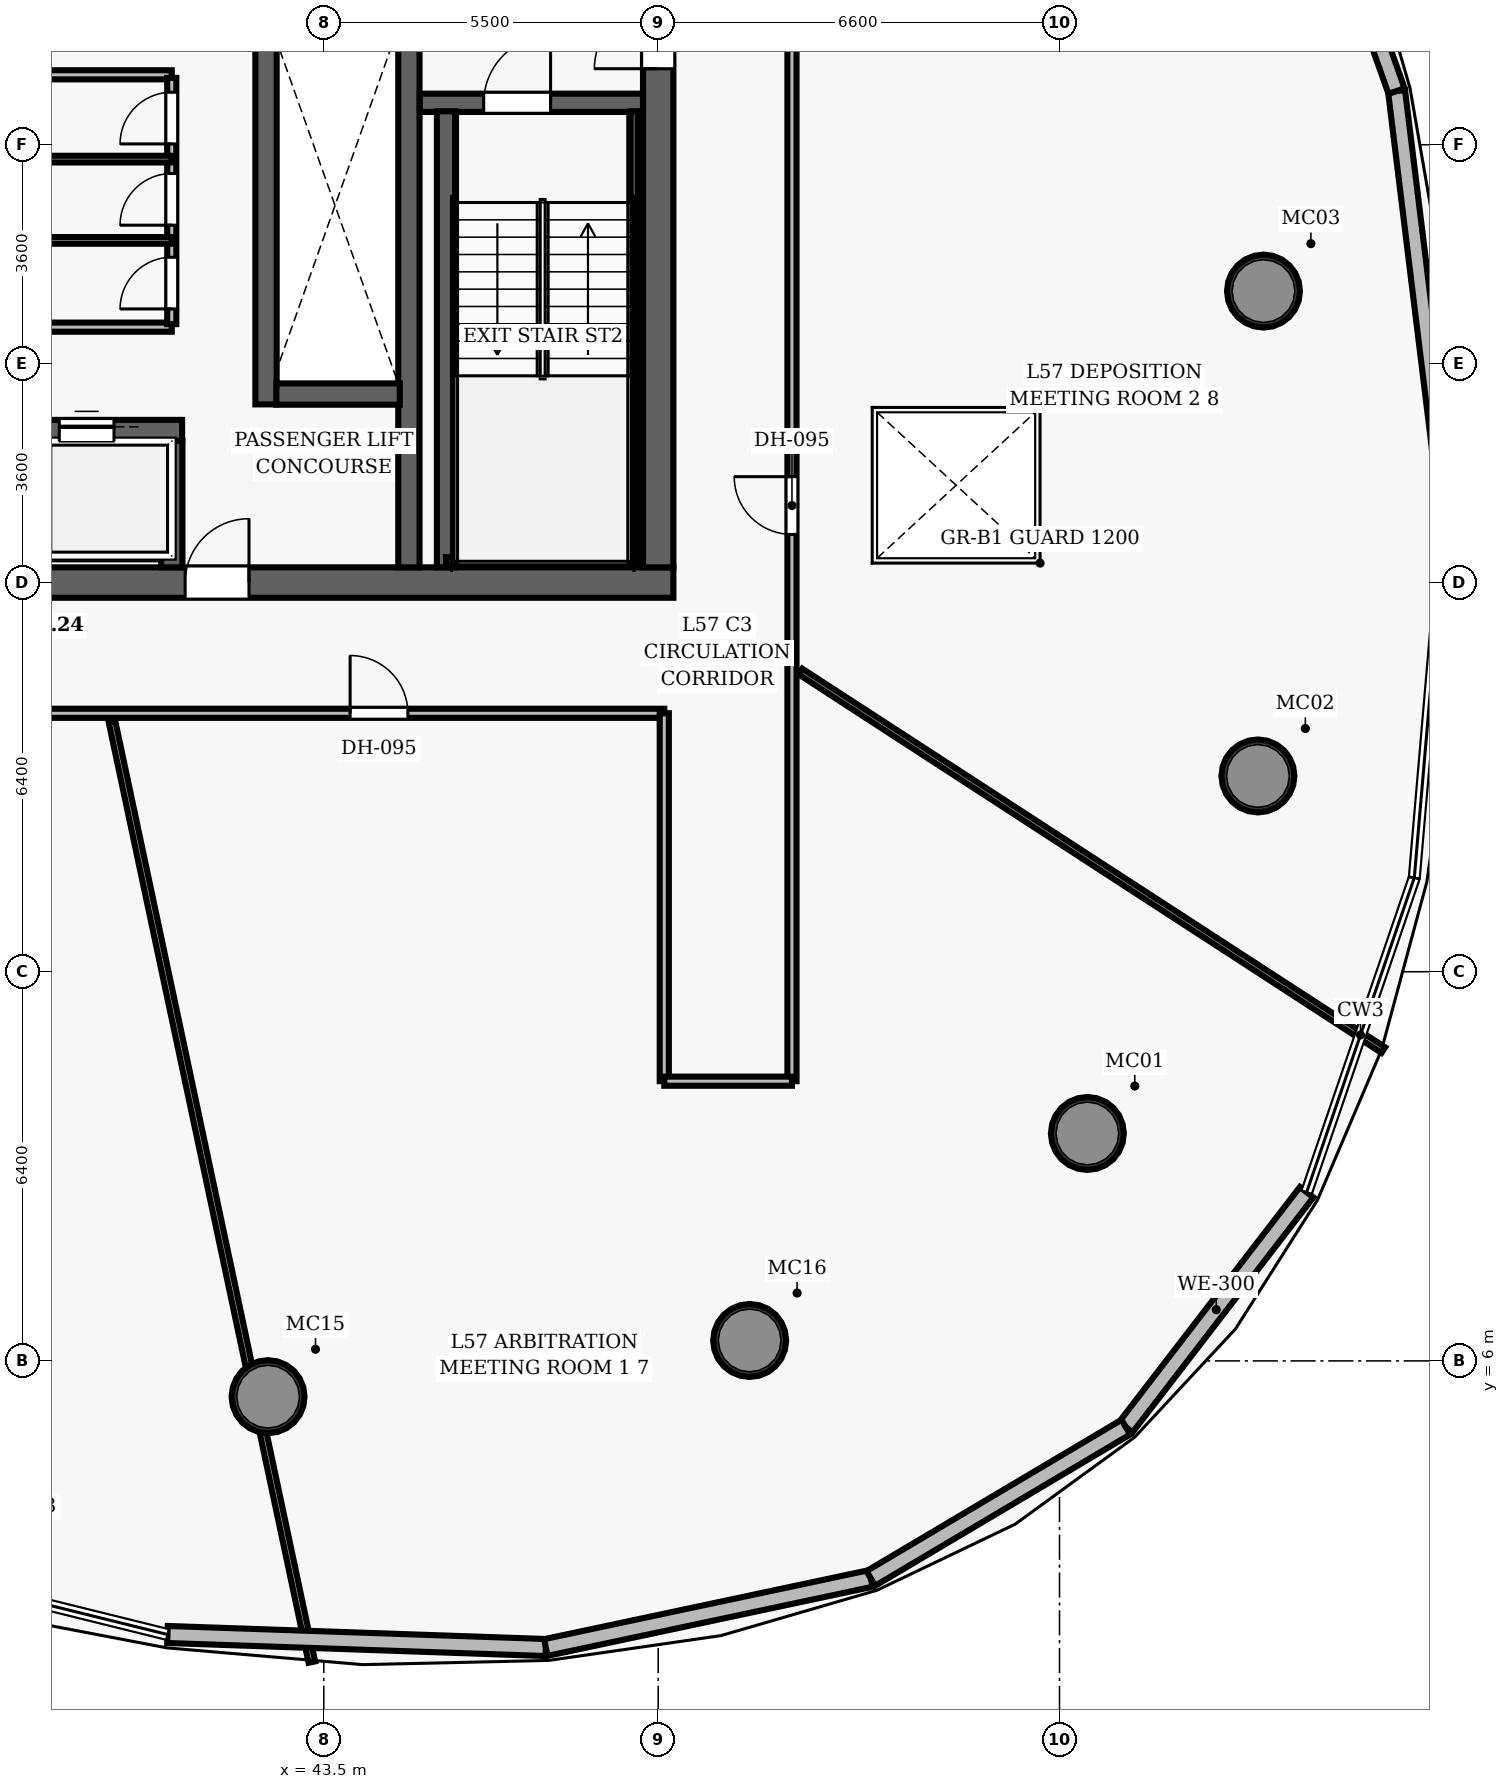
"""IFC4 building model, lengths in metres.
Left out: names, types, materials, properties, quantities, classifications, styles, units other than length and angle.
Written with IfcOpenShell. Run it as: python <this file> out.ifc"""

import sys

from ifc_helpers import new_model, si_unit, direction, frame, frame_2d, origin, origin_2d, place, context, subcontext, project, spatial, rectangle, hollow_circle, extrude, element, fill, save


model = new_model("IFC4")
c1 = context("Model", 3, precision=1e-05, world=origin(), true_north=direction((0.0, 1.0)))
c2 = subcontext(c1, "Body", "Model", "MODEL_VIEW")
j1 = project(units=[si_unit("LENGTHUNIT", "METRE"), si_unit("PLANEANGLEUNIT", "RADIAN")], contexts=[c1])
p1 = place(None, origin())
s1 = spatial("IfcSite", under=j1, at=p1, CompositionType="ELEMENT")
p2 = place(p1, origin())
s2 = spatial("IfcBuilding", under=s1, at=p2, CompositionType="ELEMENT")
p3 = place(p2, frame((0.0, 0.0, 225.1)))
s3 = spatial("IfcBuildingStorey", under=s2, at=p3, CompositionType="ELEMENT", Elevation=225.1)
p4 = place(p3, frame((26.75, 18.8, 0.0), z_axis=(0.0, 0.0, 1.0), x_axis=(1.0, 0.0, 0.0)))
e1 = element("IfcWall", 1, at=p4, inside=s3, PredefinedType="SHEAR", context=c2, shape_type="SweptSolid", body=[
    extrude(rectangle(XDim=22.5, YDim=0.5, at=frame_2d((11.25, 0.0))), origin(), (0.0, 0.0, 1.0), 3.85),
])
p5 = place(p4, frame((14.47, 0.0, 0.0)))
e2 = element("IfcOpeningElement", 2, at=p5, cuts=e1, PredefinedType="OPENING", context=c2, shape_type="SweptSolid", body=[
    extrude(rectangle(XDim=1.05, YDim=2.15, at=frame_2d((0.525, 1.075))), frame((0.0, 0.26, 0.0), z_axis=(0.0, -1.0, 0.0), x_axis=(1.0, 0.0, 0.0)), (0.0, 0.0, 1.0), 0.52),
])
p6 = place(p3, frame((49.0, 19.05, 0.0), z_axis=(0.0, 0.0, 1.0), x_axis=(0.0, 1.0, 0.0)))
e3 = element("IfcWall", 3, at=p6, inside=s3, PredefinedType="SHEAR", context=c2, shape_type="SweptSolid", body=[
    extrude(rectangle(XDim=13.9, YDim=0.5, at=frame_2d((6.95, 0.0))), origin(), (0.0, 0.0, 1.0), 3.85),
])
p7 = place(p6, frame((8.2, 0.0, 0.0)))
e4 = element("IfcOpeningElement", 4, at=p7, cuts=e3, PredefinedType="OPENING", context=c2, shape_type="SweptSolid", body=[
    extrude(rectangle(XDim=1.05, YDim=2.15, at=frame_2d((0.525, 1.075))), frame((0.0, 0.26, 0.0), z_axis=(0.0, -1.0, 0.0), x_axis=(1.0, 0.0, 0.0)), (0.0, 0.0, 1.0), 0.52),
])
p8 = place(p3, frame((44.9, 19.05, 0.0), z_axis=(0.0, 0.0, 1.0), x_axis=(0.0, 1.0, 0.0)))
e5 = element("IfcWall", 5, at=p8, inside=s3, PredefinedType="SHEAR", context=c2, shape_type="SweptSolid", body=[
    extrude(rectangle(XDim=13.9, YDim=0.35, at=frame_2d((6.95, 0.0))), origin(), (0.0, 0.0, 1.0), 3.85),
])
for number, where, z_axis, x_axis in (
    (6, (56.058, 9.74, 0.0), (0.0, 0.0, 1.0), (1.0, 0.0, 0.0)),
    (7, (58.863, 15.619, 0.0), (0.0, 0.0, 1.0), (1.0, 0.0, 0.0)),
    (8, (58.955, 23.594, 0.0), (0.0, 0.0, 1.0), (1.0, 0.0, 0.0)),
    (9, (42.584, 5.412, 0.0), (0.0, 0.0, 1.0), (1.0, 0.0, 0.0)),
    (10, (50.504, 6.336, 0.0), (0.0, 0.0, 1.0), (1.0, 0.0, 0.0)),
):
    element("IfcColumn", number, at=place(p3, frame(where, z_axis=z_axis, x_axis=x_axis)), inside=s3, PredefinedType="COLUMN", context=c2, shape_type="SweptSolid", body=[
        extrude(hollow_circle(Radius=0.6, WallThickness=0.05, at=origin_2d()), origin(), (0.0, 0.0, 1.0), 3.85),
    ])
p9 = place(p3, frame((45.08, 26.69, 0.0), z_axis=(0.0, 0.0, 1.0), x_axis=(1.0, 0.0, 0.0)))
e11 = element("IfcWall", 11, at=p9, inside=s3, PredefinedType="SHEAR", context=c2, shape_type="SweptSolid", body=[
    extrude(rectangle(XDim=3.67, YDim=0.3, at=frame_2d((1.835, 0.0))), origin(), (0.0, 0.0, 1.0), 3.85),
])
p10 = place(p9, frame((1.05, 0.0, 0.0)))
e12 = element("IfcOpeningElement", 12, at=p10, cuts=e11, PredefinedType="OPENING", context=c2, shape_type="SweptSolid", body=[
    extrude(rectangle(XDim=1.1, YDim=2.15, at=frame_2d((0.55, 1.075))), frame((0.0, 0.16, 0.0), z_axis=(0.0, -1.0, 0.0), x_axis=(1.0, 0.0, 0.0)), (0.0, 0.0, 1.0), 0.32),
])
p11 = place(p3, frame((45.51, 19.05, 0.0), z_axis=(0.0, 0.0, 1.0), x_axis=(0.0, 1.0, 0.0)))
e13 = element("IfcWall", 13, at=p11, inside=s3, PredefinedType="SHEAR", context=c2, shape_type="SweptSolid", body=[
    extrude(rectangle(XDim=7.5, YDim=0.3, at=frame_2d((3.75, 0.0))), origin(), (0.0, 0.0, 1.0), 3.85),
])
p12 = place(p3, frame((48.605, 19.1, 0.0), z_axis=(0.0, 0.0, 1.0), x_axis=(0.0, 1.0, 0.0)))
e14 = element("IfcWall", 14, at=p12, inside=s3, PredefinedType="SHEAR", context=c2, shape_type="SweptSolid", body=[
    extrude(rectangle(XDim=7.45, YDim=0.12, at=frame_2d((3.725, 0.0))), origin(), (0.0, 0.0, 1.0), 3.85),
])
p13 = place(p3, frame((45.51, 19.16, 0.0), z_axis=(0.0, 0.0, 1.0), x_axis=(1.0, 0.0, 0.0)))
e15 = element("IfcWall", 15, at=p13, inside=s3, PredefinedType="SHEAR", context=c2, shape_type="SweptSolid", body=[
    extrude(rectangle(XDim=3.095, YDim=0.12, at=frame_2d((1.547, 0.0))), origin(), (0.0, 0.0, 1.0), 3.85),
])
p14 = place(p3, frame((42.55, 21.73, 0.0), z_axis=(0.0, 0.0, 1.0), x_axis=(0.0, 1.0, 0.0)))
e16 = element("IfcWall", 16, at=p14, inside=s3, PredefinedType="SHEAR", context=c2, shape_type="SweptSolid", body=[
    extrude(rectangle(XDim=6.54, YDim=0.35, at=frame_2d((3.27, 0.0))), origin(), (0.0, 0.0, 1.0), 3.035),
])
p15 = place(p3, frame((42.72, 21.9, 0.0), z_axis=(0.0, 0.0, 1.0), x_axis=(1.0, 0.0, 0.0)))
e17 = element("IfcWall", 17, at=p15, inside=s3, PredefinedType="SHEAR", context=c2, shape_type="SweptSolid", body=[
    extrude(rectangle(XDim=2.03, YDim=0.35, at=frame_2d((1.015, 0.0))), origin(), (0.0, 0.0, 1.0), 3.035),
])
p16 = place(p3, frame((34.49, 21.3, 0.0), z_axis=(0.0, 0.0, 1.0), x_axis=(1.0, 0.0, 0.0)))
e18 = element("IfcWall", 18, at=p16, inside=s3, PredefinedType="SHEAR", context=c2, shape_type="SweptSolid", body=[
    extrude(rectangle(XDim=6.68, YDim=0.35, at=frame_2d((3.34, 0.0))), origin(), (0.0, 0.0, 1.0), 3.035),
])
p17 = place(p16, frame((0.5, 0.0, 0.0)))
e19 = element("IfcOpeningElement", 19, at=p17, cuts=e18, PredefinedType="OPENING", context=c2, shape_type="SweptSolid", body=[
    extrude(rectangle(XDim=0.9, YDim=2.15, at=frame_2d((0.45, 1.075))), frame((0.0, 0.185, 0.0), z_axis=(0.0, -1.0, 0.0), x_axis=(1.0, 0.0, 0.0)), (0.0, 0.0, 1.0), 0.37),
])
p18 = place(p16, frame((2.58, 0.0, 0.0)))
e20 = element("IfcOpeningElement", 20, at=p18, cuts=e18, PredefinedType="OPENING", context=c2, shape_type="SweptSolid", body=[
    extrude(rectangle(XDim=0.9, YDim=2.15, at=frame_2d((0.45, 1.075))), frame((0.0, 0.185, 0.0), z_axis=(0.0, -1.0, 0.0), x_axis=(1.0, 0.0, 0.0)), (0.0, 0.0, 1.0), 0.37),
])
p19 = place(p16, frame((4.66, 0.0, 0.0)))
e21 = element("IfcOpeningElement", 21, at=p19, cuts=e18, PredefinedType="OPENING", context=c2, shape_type="SweptSolid", body=[
    extrude(rectangle(XDim=0.9, YDim=2.15, at=frame_2d((0.45, 1.075))), frame((0.0, 0.185, 0.0), z_axis=(0.0, -1.0, 0.0), x_axis=(1.0, 0.0, 0.0)), (0.0, 0.0, 1.0), 0.37),
])
p20 = place(p3, frame((41.0, 19.05, 0.0), z_axis=(0.0, 0.0, 1.0), x_axis=(0.0, 1.0, 0.0)))
e22 = element("IfcWall", 22, at=p20, inside=s3, PredefinedType="SHEAR", context=c2, shape_type="SweptSolid", body=[
    extrude(rectangle(XDim=2.08, YDim=0.35, at=frame_2d((1.04, 0.0))), origin(), (0.0, 0.0, 1.0), 3.035),
])
p21 = place(p3, frame((34.75, 23.0, 0.0), z_axis=(0.0, 0.0, 1.0), x_axis=(1.0, 0.0, 0.0)))
e23 = element("IfcWall", 23, at=p21, inside=s3, PredefinedType="PARTITIONING", context=c2, shape_type="SweptSolid", body=[
    extrude(rectangle(XDim=6.25, YDim=0.15, at=frame_2d((3.125, 0.0))), origin(), (0.0, 0.0, 1.0), 3.035),
])
p22 = place(p3, frame((34.64, 27.15, 0.0), z_axis=(0.0, 0.0, 1.0), x_axis=(1.0, 0.0, 0.0)))
e24 = element("IfcWall", 24, at=p22, inside=s3, PredefinedType="PARTITIONING", context=c2, shape_type="SweptSolid", body=[
    extrude(rectangle(XDim=6.36, YDim=0.15, at=frame_2d((3.18, 0.0))), origin(), (0.0, 0.0, 1.0), 3.035),
])
p23 = place(p3, frame((41.0, 23.05, 0.0), z_axis=(0.0, 0.0, 1.0), x_axis=(0.0, 1.0, 0.0)))
e25 = element("IfcWall", 25, at=p23, inside=s3, PredefinedType="PARTITIONING", context=c2, shape_type="SweptSolid", body=[
    extrude(rectangle(XDim=4.05, YDim=0.15, at=frame_2d((2.025, 0.0))), origin(), (0.0, 0.0, 1.0), 3.035),
])
p24 = place(p23, frame((0.25, 0.0, 0.0)))
e26 = element("IfcOpeningElement", 26, at=p24, cuts=e25, PredefinedType="OPENING", context=c2, shape_type="SweptSolid", body=[
    extrude(rectangle(XDim=0.85, YDim=2.1, at=frame_2d((0.425, 1.05))), frame((0.0, 0.085, 0.0), z_axis=(0.0, -1.0, 0.0), x_axis=(1.0, 0.0, 0.0)), (0.0, 0.0, 1.0), 0.17),
])
p25 = place(p23, frame((1.627, 0.0, 0.0)))
e27 = element("IfcOpeningElement", 27, at=p25, cuts=e25, PredefinedType="OPENING", context=c2, shape_type="SweptSolid", body=[
    extrude(rectangle(XDim=0.85, YDim=2.1, at=frame_2d((0.425, 1.05))), frame((0.0, 0.085, 0.0), z_axis=(0.0, -1.0, 0.0), x_axis=(1.0, 0.0, 0.0)), (0.0, 0.0, 1.0), 0.17),
])
p26 = place(p23, frame((2.963, 0.0, 0.0)))
e28 = element("IfcOpeningElement", 28, at=p26, cuts=e25, PredefinedType="OPENING", context=c2, shape_type="SweptSolid", body=[
    extrude(rectangle(XDim=0.85, YDim=2.1, at=frame_2d((0.425, 1.05))), frame((0.0, 0.085, 0.0), z_axis=(0.0, -1.0, 0.0), x_axis=(1.0, 0.0, 0.0)), (0.0, 0.0, 1.0), 0.17),
])
for number, where, z_axis, x_axis in (
    (29, (34.75, 24.427, 0.0), (0.0, 0.0, 1.0), (1.0, 0.0, 0.0)),
    (30, (34.75, 25.763, 0.0), (0.0, 0.0, 1.0), (1.0, 0.0, 0.0)),
):
    element("IfcWall", number, at=place(p3, frame(where, z_axis=z_axis, x_axis=x_axis)), inside=s3, PredefinedType="PARTITIONING", context=c2, shape_type="SweptSolid", body=[
        extrude(rectangle(XDim=6.25, YDim=0.11, at=frame_2d((3.125, 0.0))), origin(), (0.0, 0.0, 1.0), 3.035),
    ])
p27 = place(p3, frame((26.9, 16.65, 0.0), z_axis=(0.0, 0.0, 1.0), x_axis=(1.0, 0.0, 0.0)))
e31 = element("IfcWall", 31, at=p27, inside=s3, PredefinedType="PARTITIONING", context=c2, shape_type="SweptSolid", body=[
    extrude(rectangle(XDim=22.2, YDim=0.15, at=frame_2d((11.1, 0.0))), origin(), (0.0, 0.0, 1.0), 3.035),
])
p28 = place(p27, frame((10.744, 0.0, 0.0)))
e32 = element("IfcOpeningElement", 32, at=p28, cuts=e31, PredefinedType="OPENING", context=c2, shape_type="SweptSolid", body=[
    extrude(rectangle(XDim=0.95, YDim=2.15, at=frame_2d((0.475, 1.075))), frame((0.0, 0.085, 0.0), z_axis=(0.0, -1.0, 0.0), x_axis=(1.0, 0.0, 0.0)), (0.0, 0.0, 1.0), 0.17),
])
p29 = place(p27, frame((17.033, 0.0, 0.0)))
e33 = element("IfcOpeningElement", 33, at=p29, cuts=e31, PredefinedType="OPENING", context=c2, shape_type="SweptSolid", body=[
    extrude(rectangle(XDim=0.95, YDim=2.15, at=frame_2d((0.475, 1.075))), frame((0.0, 0.085, 0.0), z_axis=(0.0, -1.0, 0.0), x_axis=(1.0, 0.0, 0.0)), (0.0, 0.0, 1.0), 0.17),
])
p30 = place(p3, frame((51.2, 10.6, 0.0), z_axis=(0.0, 0.0, 1.0), x_axis=(0.0, 1.0, 0.0)))
e34 = element("IfcWall", 34, at=p30, inside=s3, PredefinedType="PARTITIONING", context=c2, shape_type="SweptSolid", body=[
    extrude(rectangle(XDim=30.8, YDim=0.15, at=frame_2d((15.4, 0.0))), origin(), (0.0, 0.0, 1.0), 3.035),
])
p31 = place(p30, frame((20.676, 0.0, 0.0)))
e35 = element("IfcOpeningElement", 35, at=p31, cuts=e34, PredefinedType="OPENING", context=c2, shape_type="SweptSolid", body=[
    extrude(rectangle(XDim=0.95, YDim=2.15, at=frame_2d((0.475, 1.075))), frame((0.0, 0.085, 0.0), z_axis=(0.0, -1.0, 0.0), x_axis=(1.0, 0.0, 0.0)), (0.0, 0.0, 1.0), 0.17),
])
p32 = place(p30, frame((8.992, 0.0, 0.0)))
e36 = element("IfcOpeningElement", 36, at=p32, cuts=e34, PredefinedType="OPENING", context=c2, shape_type="SweptSolid", body=[
    extrude(rectangle(XDim=0.95, YDim=2.15, at=frame_2d((0.475, 1.075))), frame((0.0, 0.085, 0.0), z_axis=(0.0, -1.0, 0.0), x_axis=(1.0, 0.0, 0.0)), (0.0, 0.0, 1.0), 0.17),
])
p33 = place(p3, frame((49.1, 10.6, 0.0), z_axis=(0.0, 0.0, 1.0), x_axis=(0.0, 1.0, 0.0)))
e37 = element("IfcWall", 37, at=p33, inside=s3, PredefinedType="PARTITIONING", context=c2, shape_type="SweptSolid", body=[
    extrude(rectangle(XDim=6.05, YDim=0.15, at=frame_2d((3.025, 0.0))), origin(), (0.0, 0.0, 1.0), 3.035),
])
p34 = place(p3, frame((49.1, 10.6, 0.0), z_axis=(0.0, 0.0, 1.0), x_axis=(1.0, 0.0, 0.0)))
e38 = element("IfcWall", 38, at=p34, inside=s3, PredefinedType="PARTITIONING", context=c2, shape_type="SweptSolid", body=[
    extrude(rectangle(XDim=2.1, YDim=0.15, at=frame_2d((1.05, 0.0))), origin(), (0.0, 0.0, 1.0), 3.035),
])
p35 = place(p3, frame((40.017, 16.51, 0.0), z_axis=(0.0, 0.0, 1.0), x_axis=(0.207916198269, -0.978146642635, 0.0)))
e39 = element("IfcWall", 39, at=p35, inside=s3, PredefinedType="PARTITIONING", context=c2, shape_type="SweptSolid", body=[
    extrude(rectangle(XDim=15.809, YDim=0.11, at=frame_2d((7.904, 0.0))), origin(), (0.0, 0.0, 1.0), 3.035),
])
p36 = place(p3, frame((51.34, 17.337, 0.0), z_axis=(0.0, 0.0, 1.0), x_axis=(0.838670967245, -0.544638420148, 0.0)))
e40 = element("IfcWall", 40, at=p36, inside=s3, PredefinedType="PARTITIONING", context=c2, shape_type="SweptSolid", body=[
    extrude(rectangle(XDim=11.429, YDim=0.11, at=frame_2d((5.715, 0.0))), origin(), (0.0, 0.0, 1.0), 3.035),
])
p37 = place(p3, frame((59.665, 8.775, 0.0), z_axis=(0.0, 0.0, 1.0), x_axis=(-0.609918825889, -0.792463895598, 0.0)))
e41 = element("IfcWall", 41, at=p37, inside=s3, PredefinedType="SOLIDWALL", context=c2, shape_type="SweptSolid", body=[
    extrude(rectangle(XDim=4.876, YDim=0.28, at=frame_2d((2.438, 0.0))), origin(), (0.0, 0.0, 1.0), 3.62),
])
p38 = place(p3, frame((61.143, 26.882, 0.0), z_axis=(0.0, 0.0, 1.0), x_axis=(0.121811070165, -0.992553304959, 0.0)))
e42 = element("IfcWall", 42, at=p38, inside=s3, PredefinedType="SOLIDWALL", context=c2, shape_type="SweptSolid", body=[
    extrude(rectangle(XDim=6.784, YDim=0.28, at=frame_2d((3.392, 0.0))), origin(), (0.0, 0.0, 1.0), 3.62),
])
p39 = place(p3, frame((58.794, 33.495, 0.0), z_axis=(0.0, 0.0, 1.0), x_axis=(0.334775620093, -0.942297874449, 0.0)))
e43 = element("IfcWall", 43, at=p39, inside=s3, PredefinedType="SOLIDWALL", context=c2, shape_type="SweptSolid", body=[
    extrude(rectangle(XDim=7.018, YDim=0.28, at=frame_2d((3.509, 0.0))), origin(), (0.0, 0.0, 1.0), 3.62),
])
p40 = place(p3, frame((47.152, 1.287, 0.0), z_axis=(0.0, 0.0, 1.0), x_axis=(-0.999408557878, 0.03438799848, 0.0)))
e44 = element("IfcWall", 44, at=p40, inside=s3, PredefinedType="SOLIDWALL", context=c2, shape_type="SweptSolid", body=[
    extrude(rectangle(XDim=6.226, YDim=0.28, at=frame_2d((3.113, 0.0))), origin(), (0.0, 0.0, 1.0), 3.62),
])
p41 = place(p3, frame((52.497, 2.422, 0.0), z_axis=(0.0, 0.0, 1.0), x_axis=(-0.978163165476, -0.207838450982, 0.0)))
e45 = element("IfcWall", 45, at=p41, inside=s3, PredefinedType="SOLIDWALL", context=c2, shape_type="SweptSolid", body=[
    extrude(rectangle(XDim=5.465, YDim=0.28, at=frame_2d((2.732, 0.0))), origin(), (0.0, 0.0, 1.0), 3.62),
])
p42 = place(p3, frame((56.691, 4.911, 0.0), z_axis=(0.0, 0.0, 1.0), x_axis=(-0.860005125164, -0.510285395335, 0.0)))
e46 = element("IfcWall", 46, at=p42, inside=s3, PredefinedType="SOLIDWALL", context=c2, shape_type="SweptSolid", body=[
    extrude(rectangle(XDim=4.876, YDim=0.28, at=frame_2d((2.438, 0.0))), origin(), (0.0, 0.0, 1.0), 3.62),
])
p43 = place(p10, origin())
e47 = element("IfcDoor", 47, at=p43, inside=s3, OperationType="SINGLE_SWING_RIGHT", PredefinedType="DOOR", context=c2, shape_type="SweptSolid", body=[
    extrude(rectangle(XDim=1.1, YDim=2.15, at=frame_2d((0.55, 1.075))), frame((0.0, 0.025, 0.0), z_axis=(0.0, -1.0, 0.0), x_axis=(1.0, 0.0, 0.0)), (0.0, 0.0, 1.0), 0.05),
])
fill(e12, e47)
p44 = place(p7, origin())
e48 = element("IfcDoor", 48, at=p44, inside=s3, OperationType="SINGLE_SWING_LEFT", PredefinedType="DOOR", context=c2, shape_type="SweptSolid", body=[
    extrude(rectangle(XDim=1.05, YDim=2.15, at=frame_2d((0.525, 1.075))), frame((0.0, 0.025, 0.0), z_axis=(0.0, -1.0, 0.0), x_axis=(1.0, 0.0, 0.0)), (0.0, 0.0, 1.0), 0.05),
])
fill(e4, e48)
p45 = place(p5, origin())
e49 = element("IfcDoor", 49, at=p45, inside=s3, OperationType="SINGLE_SWING_RIGHT", PredefinedType="DOOR", context=c2, shape_type="SweptSolid", body=[
    extrude(rectangle(XDim=1.05, YDim=2.15, at=frame_2d((0.525, 1.075))), frame((0.0, 0.025, 0.0), z_axis=(0.0, -1.0, 0.0), x_axis=(1.0, 0.0, 0.0)), (0.0, 0.0, 1.0), 0.05),
])
fill(e2, e49)
p46 = place(p24, origin())
e50 = element("IfcDoor", 50, at=p46, inside=s3, OperationType="SINGLE_SWING_LEFT", PredefinedType="DOOR", context=c2, shape_type="SweptSolid", body=[
    extrude(rectangle(XDim=0.85, YDim=2.1, at=frame_2d((0.425, 1.05))), frame((0.0, 0.025, 0.0), z_axis=(0.0, -1.0, 0.0), x_axis=(1.0, 0.0, 0.0)), (0.0, 0.0, 1.0), 0.05),
])
fill(e26, e50)
p47 = place(p25, origin())
e51 = element("IfcDoor", 51, at=p47, inside=s3, OperationType="SINGLE_SWING_LEFT", PredefinedType="DOOR", context=c2, shape_type="SweptSolid", body=[
    extrude(rectangle(XDim=0.85, YDim=2.1, at=frame_2d((0.425, 1.05))), frame((0.0, 0.025, 0.0), z_axis=(0.0, -1.0, 0.0), x_axis=(1.0, 0.0, 0.0)), (0.0, 0.0, 1.0), 0.05),
])
fill(e27, e51)
p48 = place(p26, origin())
e52 = element("IfcDoor", 52, at=p48, inside=s3, OperationType="SINGLE_SWING_LEFT", PredefinedType="DOOR", context=c2, shape_type="SweptSolid", body=[
    extrude(rectangle(XDim=0.85, YDim=2.1, at=frame_2d((0.425, 1.05))), frame((0.0, 0.025, 0.0), z_axis=(0.0, -1.0, 0.0), x_axis=(1.0, 0.0, 0.0)), (0.0, 0.0, 1.0), 0.05),
])
fill(e28, e52)
p49 = place(p29, origin())
e53 = element("IfcDoor", 53, at=p49, inside=s3, OperationType="SINGLE_SWING_LEFT", PredefinedType="DOOR", context=c2, shape_type="SweptSolid", body=[
    extrude(rectangle(XDim=0.95, YDim=2.15, at=frame_2d((0.475, 1.075))), frame((0.0, 0.025, 0.0), z_axis=(0.0, -1.0, 0.0), x_axis=(1.0, 0.0, 0.0)), (0.0, 0.0, 1.0), 0.05),
])
fill(e33, e53)
p50 = place(p32, origin())
e54 = element("IfcDoor", 54, at=p50, inside=s3, OperationType="SINGLE_SWING_RIGHT", PredefinedType="DOOR", context=c2, shape_type="SweptSolid", body=[
    extrude(rectangle(XDim=0.95, YDim=2.15, at=frame_2d((0.475, 1.075))), frame((0.0, 0.025, 0.0), z_axis=(0.0, -1.0, 0.0), x_axis=(1.0, 0.0, 0.0)), (0.0, 0.0, 1.0), 0.05),
])
fill(e36, e54)
p51 = place(p19, origin())
e55 = element("IfcDoor", 55, at=p51, inside=s3, OperationType="SLIDING_TO_LEFT", PredefinedType="DOOR", context=c2, shape_type="SweptSolid", body=[
    extrude(rectangle(XDim=0.9, YDim=2.15, at=frame_2d((0.45, 1.075))), frame((0.0, 0.025, 0.0), z_axis=(0.0, -1.0, 0.0), x_axis=(1.0, 0.0, 0.0)), (0.0, 0.0, 1.0), 0.05),
])
fill(e21, e55)
save(model, sys.argv[1])
